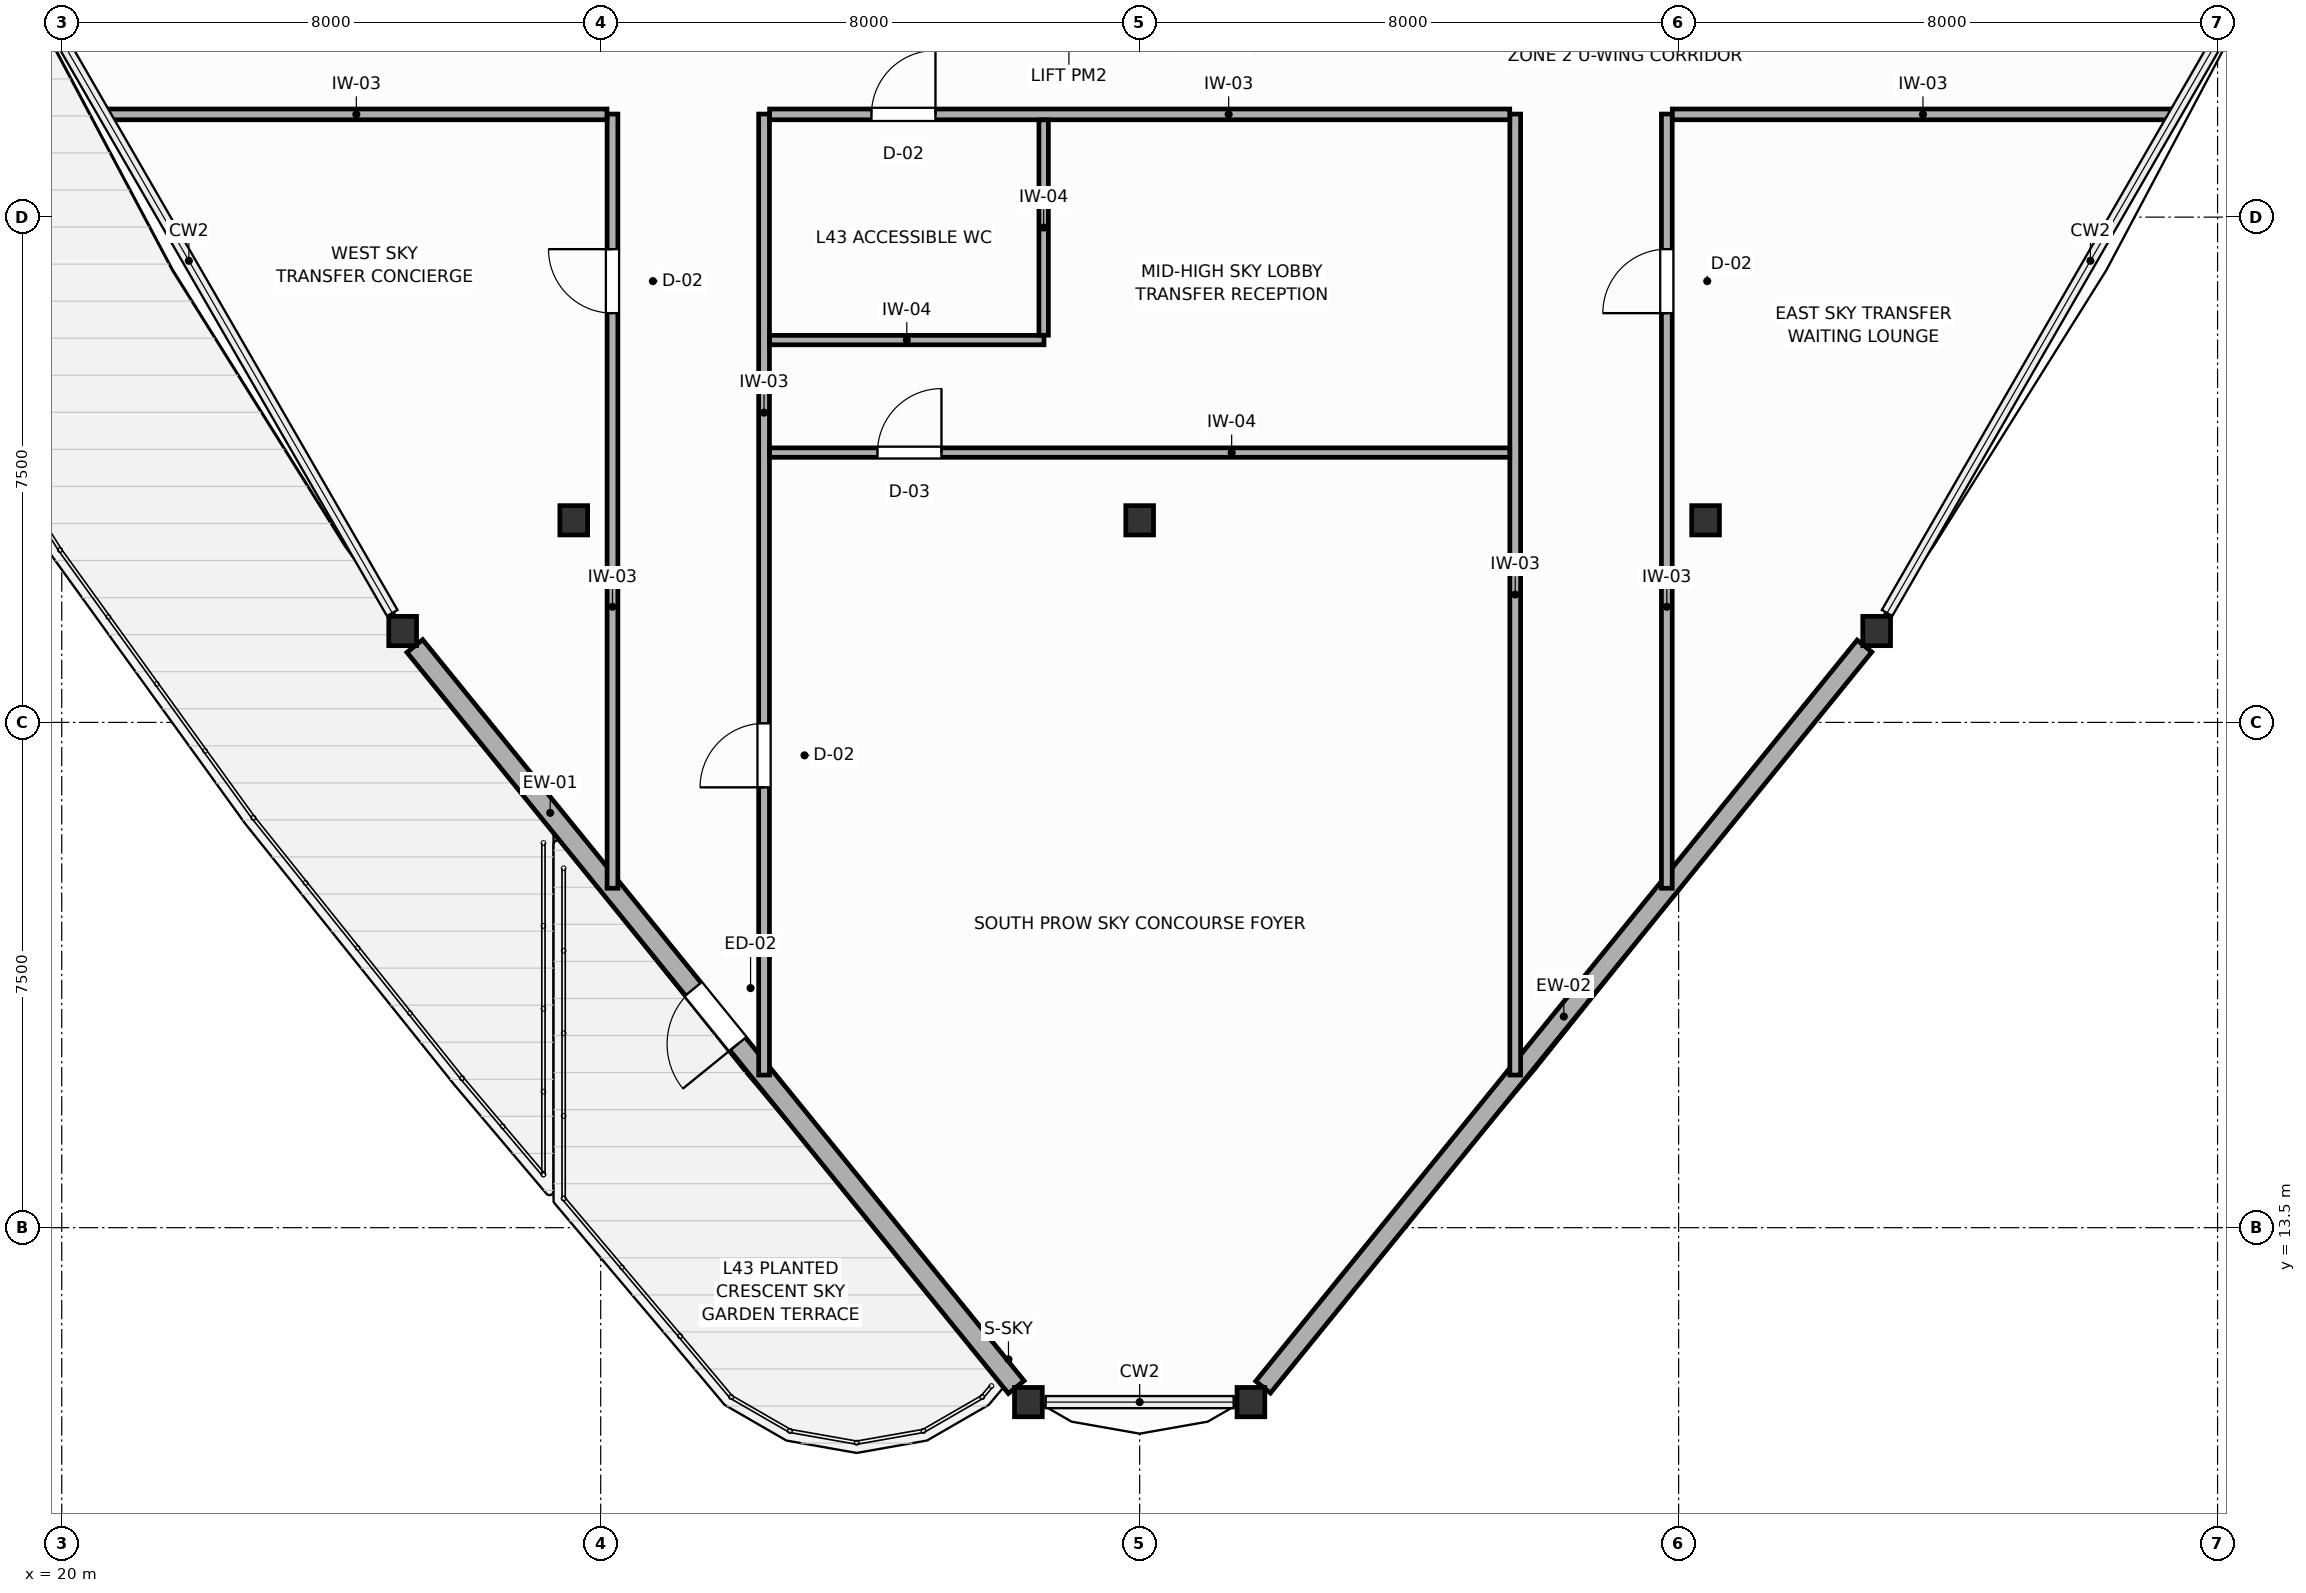
"""IFC4 building model, lengths in metres.
Left out: names, types, materials, properties, quantities, classifications, styles, units other than length and angle.
Written with IfcOpenShell. Run it as: python <this file> out.ifc"""

import sys

from ifc_helpers import new_model, si_unit, direction, frame, frame_2d, origin, origin_2d, place, context, subcontext, project, spatial, rectangle, i_section, extrude, source, transform, mapped, element, fill, save


model = new_model("IFC4")
c1 = context("Model", 3, precision=1e-05, world=origin(), true_north=direction((0.0, 1.0)))
c2 = subcontext(c1, "Body", "Model", "MODEL_VIEW")
j1 = project(units=[si_unit("LENGTHUNIT", "METRE"), si_unit("PLANEANGLEUNIT", "RADIAN")], contexts=[c1])
p1 = place(None, origin())
s1 = spatial("IfcSite", under=j1, at=p1, CompositionType="ELEMENT")
p2 = place(p1, origin())
s2 = spatial("IfcBuilding", under=s1, at=p2, CompositionType="ELEMENT")
p3 = place(p2, frame((0.0, 0.0, 168.6)))
s3 = spatial("IfcBuildingStorey", under=s2, at=p3, CompositionType="ELEMENT", Elevation=168.6)
m1 = source(origin(), c2, "Body", "SweptSolid", [
    extrude(i_section(OverallWidth=0.412, OverallDepth=0.435, WebThickness=0.033, FlangeThickness=0.053, FilletRadius=0.015, at=origin_2d()), origin(), (0.0, 0.0, 1.0), 3.6),
])
for number, where, z_axis, x_axis in (
    (1, (27.6, 24.0, 0.0), (0.0, 0.0, 1.0), (1.0, 0.0, 0.0)),
    (2, (44.4, 24.0, 0.0), (0.0, 0.0, 1.0), (1.0, 0.0, 0.0)),
    (3, (36.0, 24.0, 0.0), (0.0, 0.0, 1.0), (1.0, 0.0, 0.0)),
    (4, (25.06, 22.356, 0.0), (0.0, 0.0, 1.0), (1.0, 0.0, 0.0)),
    (5, (34.348, 10.911, 0.0), (0.0, 0.0, 1.0), (1.0, 0.0, 0.0)),
    (6, (37.652, 10.911, 0.0), (0.0, 0.0, 1.0), (1.0, 0.0, 0.0)),
    (7, (46.94, 22.356, 0.0), (0.0, 0.0, 1.0), (1.0, 0.0, 0.0)),
):
    element("IfcColumn", number, at=place(p3, frame(where, z_axis=z_axis, x_axis=x_axis)), inside=s3, PredefinedType="COLUMN", context=c2, shape_type="MappedRepresentation", body=[
        mapped(m1, transform((0.0, 0.0, 0.0), scale=1.0)),
    ])
p4 = place(p3, frame((25.241, 22.134, 0.0), z_axis=(0.0, 0.0, 1.0), x_axis=(0.630110463711, -0.776505507722, 0.0)))
e8 = element("IfcWall", 8, at=p4, inside=s3, PredefinedType="SOLIDWALL", context=c2, shape_type="SweptSolid", body=[
    extrude(rectangle(XDim=14.167, YDim=0.3, at=frame_2d((7.083, 0.0))), origin(), (0.0, 0.0, 1.0), 3.0),
])
p5 = place(p4, frame((6.559, 0.0, 0.0)))
e9 = element("IfcOpeningElement", 9, at=p5, cuts=e8, PredefinedType="OPENING", context=c2, shape_type="SweptSolid", body=[
    extrude(rectangle(XDim=1.05, YDim=2.1, at=frame_2d((0.525, 1.05))), frame((0.0, 0.16, 0.0), z_axis=(0.0, -1.0, 0.0), x_axis=(1.0, 0.0, 0.0)), (0.0, 0.0, 1.0), 0.32),
])
p6 = place(p3, frame((37.832, 11.133, 0.0), z_axis=(0.0, 0.0, 1.0), x_axis=(0.630110463711, 0.776505507722, 0.0)))
e10 = element("IfcWall", 10, at=p6, inside=s3, PredefinedType="SOLIDWALL", context=c2, shape_type="SweptSolid", body=[
    extrude(rectangle(XDim=14.167, YDim=0.28, at=frame_2d((7.083, 0.0))), origin(), (0.0, 0.0, 1.0), 3.0),
])
p7 = place(p3, frame((30.425, 15.765, 0.0), z_axis=(0.0, 0.0, 1.0), x_axis=(0.0, 1.0, 0.0)))
e11 = element("IfcWall", 11, at=p7, inside=s3, PredefinedType="PARTITIONING", context=c2, shape_type="SweptSolid", body=[
    extrude(rectangle(XDim=14.265, YDim=0.16, at=frame_2d((7.132, 0.0))), origin(), (0.0, 0.0, 1.0), 3.4),
])
p8 = place(p7, frame((4.271, 0.0, 0.0)))
e12 = element("IfcOpeningElement", 12, at=p8, cuts=e11, PredefinedType="OPENING", context=c2, shape_type="SweptSolid", body=[
    extrude(rectangle(XDim=0.95, YDim=2.05, at=frame_2d((0.475, 1.025))), frame((0.0, 0.09, 0.0), z_axis=(0.0, -1.0, 0.0), x_axis=(1.0, 0.0, 0.0)), (0.0, 0.0, 1.0), 0.18),
])
p9 = place(p3, frame((41.575, 15.765, 0.0), z_axis=(0.0, 0.0, 1.0), x_axis=(0.0, 1.0, 0.0)))
e13 = element("IfcWall", 13, at=p9, inside=s3, PredefinedType="PARTITIONING", context=c2, shape_type="SweptSolid", body=[
    extrude(rectangle(XDim=14.265, YDim=0.16, at=frame_2d((7.132, 0.0))), origin(), (0.0, 0.0, 1.0), 3.4),
])
p10 = place(p3, frame((28.175, 18.538, 0.0), z_axis=(0.0, 0.0, 1.0), x_axis=(0.0, 1.0, 0.0)))
e14 = element("IfcWall", 14, at=p10, inside=s3, PredefinedType="PARTITIONING", context=c2, shape_type="SweptSolid", body=[
    extrude(rectangle(XDim=11.492, YDim=0.16, at=frame_2d((5.746, 0.0))), origin(), (0.0, 0.0, 1.0), 3.4),
])
p11 = place(p10, frame((8.537, 0.0, 0.0)))
e15 = element("IfcOpeningElement", 15, at=p11, cuts=e14, PredefinedType="OPENING", context=c2, shape_type="SweptSolid", body=[
    extrude(rectangle(XDim=0.95, YDim=2.05, at=frame_2d((0.475, 1.025))), frame((0.0, 0.09, 0.0), z_axis=(0.0, -1.0, 0.0), x_axis=(1.0, 0.0, 0.0)), (0.0, 0.0, 1.0), 0.18),
])
p12 = place(p3, frame((43.825, 18.538, 0.0), z_axis=(0.0, 0.0, 1.0), x_axis=(0.0, 1.0, 0.0)))
e16 = element("IfcWall", 16, at=p12, inside=s3, PredefinedType="PARTITIONING", context=c2, shape_type="SweptSolid", body=[
    extrude(rectangle(XDim=11.492, YDim=0.16, at=frame_2d((5.746, 0.0))), origin(), (0.0, 0.0, 1.0), 3.0),
])
p13 = place(p12, frame((8.537, 0.0, 0.0)))
e17 = element("IfcOpeningElement", 17, at=p13, cuts=e16, PredefinedType="OPENING", context=c2, shape_type="SweptSolid", body=[
    extrude(rectangle(XDim=0.95, YDim=2.05, at=frame_2d((0.475, 1.025))), frame((0.0, 0.09, 0.0), z_axis=(0.0, -1.0, 0.0), x_axis=(1.0, 0.0, 0.0)), (0.0, 0.0, 1.0), 0.18),
])
p14 = place(p3, frame((30.507, 30.025, 0.0), z_axis=(0.0, 0.0, 1.0), x_axis=(1.0, 0.0, 0.0)))
e18 = element("IfcWall", 18, at=p14, inside=s3, PredefinedType="PARTITIONING", context=c2, shape_type="SweptSolid", body=[
    extrude(rectangle(XDim=10.986, YDim=0.16, at=frame_2d((5.493, 0.0))), origin(), (0.0, 0.0, 1.0), 3.4),
])
p15 = place(p14, frame((1.512, 0.0, 0.0)))
e19 = element("IfcOpeningElement", 19, at=p15, cuts=e18, PredefinedType="OPENING", context=c2, shape_type="SweptSolid", body=[
    extrude(rectangle(XDim=0.95, YDim=2.05, at=frame_2d((0.475, 1.025))), frame((0.0, 0.09, 0.0), z_axis=(0.0, -1.0, 0.0), x_axis=(1.0, 0.0, 0.0)), (0.0, 0.0, 1.0), 0.18),
])
for number, where, z_axis, x_axis in (
    (20, (20.653, 30.025, 0.0), (0.0, 0.0, 1.0), (1.0, 0.0, 0.0)),
    (21, (43.907, 30.025, 0.0), (0.0, 0.0, 1.0), (1.0, 0.0, 0.0)),
):
    element("IfcWall", number, at=place(p3, frame(where, z_axis=z_axis, x_axis=x_axis)), inside=s3, PredefinedType="PARTITIONING", context=c2, shape_type="SweptSolid", body=[
        extrude(rectangle(XDim=7.44, YDim=0.16, at=frame_2d((3.72, 0.0))), origin(), (0.0, 0.0, 1.0), 3.4),
    ])
p16 = place(p3, frame((30.507, 25.005, 0.0), z_axis=(0.0, 0.0, 1.0), x_axis=(1.0, 0.0, 0.0)))
e22 = element("IfcWall", 22, at=p16, inside=s3, PredefinedType="PARTITIONING", context=c2, shape_type="SweptSolid", body=[
    extrude(rectangle(XDim=10.986, YDim=0.14, at=frame_2d((5.493, 0.0))), origin(), (0.0, 0.0, 1.0), 3.4),
])
p17 = place(p16, frame((1.601, 0.0, 0.0)))
e23 = element("IfcOpeningElement", 23, at=p17, cuts=e22, PredefinedType="OPENING", context=c2, shape_type="SweptSolid", body=[
    extrude(rectangle(XDim=0.95, YDim=2.05, at=frame_2d((0.475, 1.025))), frame((0.0, 0.08, 0.0), z_axis=(0.0, -1.0, 0.0), x_axis=(1.0, 0.0, 0.0)), (0.0, 0.0, 1.0), 0.16),
])
p18 = place(p3, frame((30.507, 26.675, 0.0), z_axis=(0.0, 0.0, 1.0), x_axis=(1.0, 0.0, 0.0)))
e24 = element("IfcWall", 24, at=p18, inside=s3, PredefinedType="PARTITIONING", context=c2, shape_type="SweptSolid", body=[
    extrude(rectangle(XDim=4.073, YDim=0.14, at=frame_2d((2.037, 0.0))), origin(), (0.0, 0.0, 1.0), 3.4),
])
p19 = place(p3, frame((34.575, 26.747, 0.0), z_axis=(0.0, 0.0, 1.0), x_axis=(0.0, 1.0, 0.0)))
e25 = element("IfcWall", 25, at=p19, inside=s3, PredefinedType="PARTITIONING", context=c2, shape_type="SweptSolid", body=[
    extrude(rectangle(XDim=3.196, YDim=0.14, at=frame_2d((1.598, 0.0))), origin(), (0.0, 0.0, 1.0), 3.4),
])
p20 = place(p5, frame((1.05, 0.0, 0.0), z_axis=(0.0, 0.0, 1.0), x_axis=(-1.0, 0.0, 0.0)))
e26 = element("IfcDoor", 26, at=p20, inside=s3, OperationType="SINGLE_SWING_LEFT", PredefinedType="DOOR", context=c2, shape_type="SweptSolid", body=[
    extrude(rectangle(XDim=1.05, YDim=2.1, at=frame_2d((0.525, 1.05))), frame((0.0, 0.025, 0.0), z_axis=(0.0, -1.0, 0.0), x_axis=(1.0, 0.0, 0.0)), (0.0, 0.0, 1.0), 0.05),
])
fill(e9, e26)
p21 = place(p8, origin())
e27 = element("IfcDoor", 27, at=p21, inside=s3, OperationType="SINGLE_SWING_LEFT", PredefinedType="DOOR", context=c2, shape_type="SweptSolid", body=[
    extrude(rectangle(XDim=0.95, YDim=2.05, at=frame_2d((0.475, 1.025))), frame((0.0, 0.025, 0.0), z_axis=(0.0, -1.0, 0.0), x_axis=(1.0, 0.0, 0.0)), (0.0, 0.0, 1.0), 0.05),
])
fill(e12, e27)
p22 = place(p11, origin())
e28 = element("IfcDoor", 28, at=p22, inside=s3, OperationType="SINGLE_SWING_RIGHT", PredefinedType="DOOR", context=c2, shape_type="SweptSolid", body=[
    extrude(rectangle(XDim=0.95, YDim=2.05, at=frame_2d((0.475, 1.025))), frame((0.0, 0.025, 0.0), z_axis=(0.0, -1.0, 0.0), x_axis=(1.0, 0.0, 0.0)), (0.0, 0.0, 1.0), 0.05),
])
fill(e15, e28)
p23 = place(p13, origin())
e29 = element("IfcDoor", 29, at=p23, inside=s3, OperationType="SINGLE_SWING_LEFT", PredefinedType="DOOR", context=c2, shape_type="SweptSolid", body=[
    extrude(rectangle(XDim=0.95, YDim=2.05, at=frame_2d((0.475, 1.025))), frame((0.0, 0.025, 0.0), z_axis=(0.0, -1.0, 0.0), x_axis=(1.0, 0.0, 0.0)), (0.0, 0.0, 1.0), 0.05),
])
fill(e17, e29)
p24 = place(p15, origin())
e30 = element("IfcDoor", 30, at=p24, inside=s3, OperationType="SINGLE_SWING_RIGHT", PredefinedType="DOOR", context=c2, shape_type="SweptSolid", body=[
    extrude(rectangle(XDim=0.95, YDim=2.05, at=frame_2d((0.475, 1.025))), frame((0.0, 0.025, 0.0), z_axis=(0.0, -1.0, 0.0), x_axis=(1.0, 0.0, 0.0)), (0.0, 0.0, 1.0), 0.05),
])
fill(e19, e30)
p25 = place(p17, origin())
e31 = element("IfcDoor", 31, at=p25, inside=s3, OperationType="SINGLE_SWING_RIGHT", PredefinedType="DOOR", context=c2, shape_type="SweptSolid", body=[
    extrude(rectangle(XDim=0.95, YDim=2.05, at=frame_2d((0.475, 1.025))), frame((0.0, 0.025, 0.0), z_axis=(0.0, -1.0, 0.0), x_axis=(1.0, 0.0, 0.0)), (0.0, 0.0, 1.0), 0.05),
])
fill(e23, e31)
save(model, sys.argv[1])
